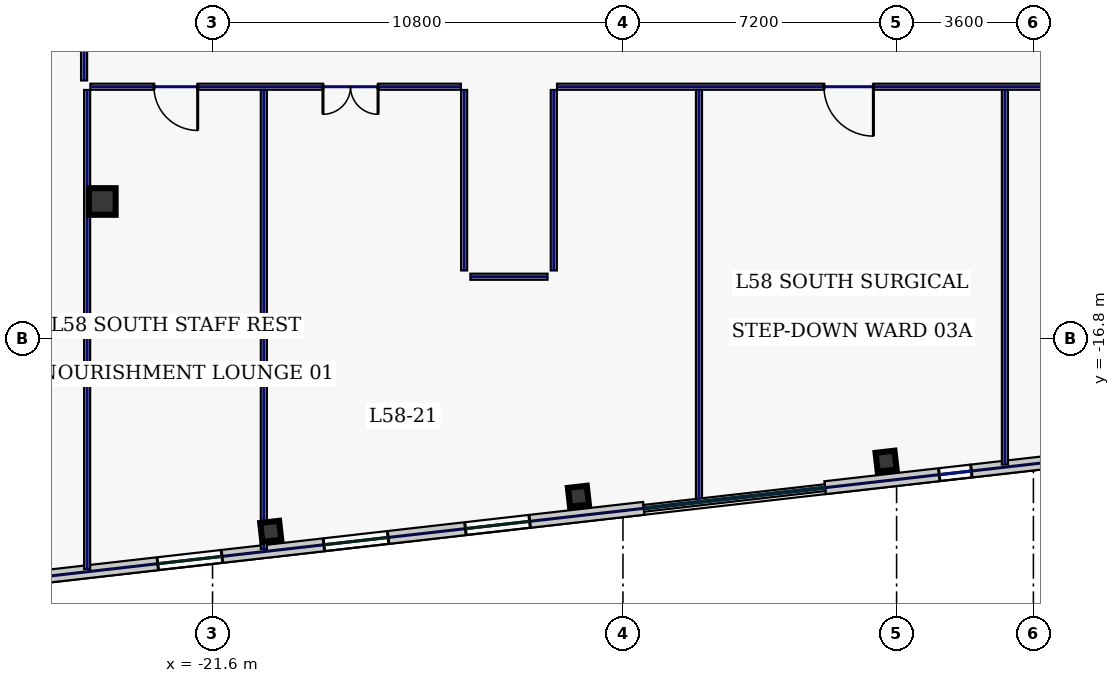
"""IFC4 building model, lengths in metres.
Left out: names, types, materials, properties, quantities, classifications, styles, units other than length and angle.
Written with IfcOpenShell. Run it as: python <this file> out.ifc"""

import sys

from ifc_helpers import new_model, si_unit, direction, frame, frame_2d, origin, origin_2d, place, context, subcontext, project, spatial, rectangle, hollow_rectangle, extrude, element, fill, save


model = new_model("IFC4")
c1 = context("Model", 3, precision=1e-05, world=origin(), true_north=direction((0.0, 1.0)))
c2 = subcontext(c1, "Body", "Model", "MODEL_VIEW")
j1 = project(units=[si_unit("LENGTHUNIT", "METRE"), si_unit("PLANEANGLEUNIT", "RADIAN")], contexts=[c1])
p1 = place(None, origin())
s1 = spatial("IfcSite", under=j1, at=p1, CompositionType="ELEMENT")
p2 = place(p1, origin())
s2 = spatial("IfcBuilding", under=s1, at=p2, CompositionType="ELEMENT")
p3 = place(p2, frame((0.0, 0.0, 251.0)))
s3 = spatial("IfcBuildingStorey", under=s2, at=p3, CompositionType="ELEMENT", Elevation=251.0)
p4 = place(p3, frame((-24.5, -13.2, 0.0), z_axis=(0.0, 0.0, 1.0), x_axis=(1.0, 0.0, 0.0)))
e1 = element("IfcColumn", 1, at=p4, inside=s3, PredefinedType="COLUMN", context=c2, shape_type="SweptSolid", body=[
    extrude(hollow_rectangle(XDim=0.7, YDim=0.7, WallThickness=0.032, at=origin_2d()), origin(), (0.0, 0.0, 1.0), 3.74),
])
for number, where, z_axis, x_axis in (
    (2, (-20.069, -21.88, 0.0), (0.0, 0.0, 1.0), (0.994, 0.113, 0.0)),
    (3, (-11.972, -20.958, 0.0), (0.0, 0.0, 1.0), (0.994, 0.113, 0.0)),
    (4, (-3.876, -20.035, 0.0), (0.0, 0.0, 1.0), (0.994, 0.113, 0.0)),
):
    element("IfcColumn", number, at=place(p3, frame(where, z_axis=z_axis, x_axis=x_axis)), inside=s3, PredefinedType="COLUMN", context=c2, shape_type="SweptSolid", body=[
        extrude(hollow_rectangle(XDim=0.5, YDim=0.5, WallThickness=0.025, at=origin_2d()), origin(), (0.0, 0.0, 1.0), 3.74),
    ])
p5 = place(p3, frame((-28.783, -23.386, 0.0), z_axis=(0.0, 0.0, 1.0), x_axis=(0.993572271362, 0.113199565282, 0.0)))
e5 = element("IfcWall", 5, at=p5, inside=s3, PredefinedType="STANDARD", context=c2, shape_type="SweptSolid", body=[
    extrude(rectangle(XDim=18.651, YDim=0.34, at=frame_2d((9.326, 0.0))), origin(), (0.0, 0.0, 1.0), 3.74),
])
p6 = place(p5, frame((2.03, 0.0, 0.88)))
e6 = element("IfcOpeningElement", 6, at=p6, cuts=e5, PredefinedType="OPENING", context=c2, shape_type="SweptSolid", body=[
    extrude(rectangle(XDim=0.85, YDim=1.85, at=frame_2d((0.425, 0.925))), frame((0.0, 0.18, 0.0), z_axis=(0.0, -1.0, 0.0), x_axis=(1.0, 0.0, 0.0)), (0.0, 0.0, 1.0), 0.36),
])
p7 = place(p5, frame((5.779, 0.0, 0.88)))
e7 = element("IfcOpeningElement", 7, at=p7, cuts=e5, PredefinedType="OPENING", context=c2, shape_type="SweptSolid", body=[
    extrude(rectangle(XDim=1.7, YDim=1.95, at=frame_2d((0.85, 0.975))), frame((0.0, 0.18, 0.0), z_axis=(0.0, -1.0, 0.0), x_axis=(1.0, 0.0, 0.0)), (0.0, 0.0, 1.0), 0.36),
])
p8 = place(p5, frame((10.179, 0.0, 0.88)))
e8 = element("IfcOpeningElement", 8, at=p8, cuts=e5, PredefinedType="OPENING", context=c2, shape_type="SweptSolid", body=[
    extrude(rectangle(XDim=1.7, YDim=1.95, at=frame_2d((0.85, 0.975))), frame((0.0, 0.18, 0.0), z_axis=(0.0, -1.0, 0.0), x_axis=(1.0, 0.0, 0.0)), (0.0, 0.0, 1.0), 0.36),
])
p9 = place(p5, frame((13.927, 0.0, 0.88)))
e9 = element("IfcOpeningElement", 9, at=p9, cuts=e5, PredefinedType="OPENING", context=c2, shape_type="SweptSolid", body=[
    extrude(rectangle(XDim=1.7, YDim=1.95, at=frame_2d((0.85, 0.975))), frame((0.0, 0.18, 0.0), z_axis=(0.0, -1.0, 0.0), x_axis=(1.0, 0.0, 0.0)), (0.0, 0.0, 1.0), 0.36),
])
p10 = place(p3, frame((-5.482, -20.731, 0.0), z_axis=(0.0, 0.0, 1.0), x_axis=(0.993571968199, 0.113202226169, 0.0)))
e10 = element("IfcWall", 10, at=p10, inside=s3, PredefinedType="STANDARD", context=c2, shape_type="SweptSolid", body=[
    extrude(rectangle(XDim=11.497, YDim=0.34, at=frame_2d((5.749, 0.0))), origin(), (0.0, 0.0, 1.0), 3.74),
])
p11 = place(p10, frame((3.024, 0.0, 0.88)))
e11 = element("IfcOpeningElement", 11, at=p11, cuts=e10, PredefinedType="OPENING", context=c2, shape_type="SweptSolid", body=[
    extrude(rectangle(XDim=0.85, YDim=1.85, at=frame_2d((0.425, 0.925))), frame((0.0, 0.18, 0.0), z_axis=(0.0, -1.0, 0.0), x_axis=(1.0, 0.0, 0.0)), (0.0, 0.0, 1.0), 0.36),
])
p12 = place(p10, frame((6.773, 0.0, 0.88)))
e12 = element("IfcOpeningElement", 12, at=p12, cuts=e10, PredefinedType="OPENING", context=c2, shape_type="SweptSolid", body=[
    extrude(rectangle(XDim=1.7, YDim=1.95, at=frame_2d((0.85, 0.975))), frame((0.0, 0.18, 0.0), z_axis=(0.0, -1.0, 0.0), x_axis=(1.0, 0.0, 0.0)), (0.0, 0.0, 1.0), 0.36),
])
p13 = place(p3, frame((-24.98, -10.015, 0.0), z_axis=(0.0, 0.0, 1.0), x_axis=(0.0, 1.0, 0.0)))
e13 = element("IfcWall", 13, at=p13, inside=s3, PredefinedType="PARTITIONING", context=c2, shape_type="SweptSolid", body=[
    extrude(rectangle(XDim=20.13, YDim=0.16, at=frame_2d((10.065, 0.0))), origin(), (0.0, 0.0, 1.0), 3.74),
])
p14 = place(p13, frame((2.169, 0.0, 0.0)))
e14 = element("IfcOpeningElement", 14, at=p14, cuts=e13, PredefinedType="OPENING", context=c2, shape_type="SweptSolid", body=[
    extrude(rectangle(XDim=0.95, YDim=2.2, at=frame_2d((0.475, 1.1))), frame((0.0, 0.09, 0.0), z_axis=(0.0, -1.0, 0.0), x_axis=(1.0, 0.0, 0.0)), (0.0, 0.0, 1.0), 0.18),
])
p15 = place(p13, frame((7.025, 0.0, 0.0)))
e15 = element("IfcOpeningElement", 15, at=p15, cuts=e13, PredefinedType="OPENING", context=c2, shape_type="SweptSolid", body=[
    extrude(rectangle(XDim=0.95, YDim=2.2, at=frame_2d((0.475, 1.1))), frame((0.0, 0.09, 0.0), z_axis=(0.0, -1.0, 0.0), x_axis=(1.0, 0.0, 0.0)), (0.0, 0.0, 1.0), 0.18),
])
p16 = place(p13, frame((12.225, 0.0, 0.0)))
e16 = element("IfcOpeningElement", 16, at=p16, cuts=e13, PredefinedType="OPENING", context=c2, shape_type="SweptSolid", body=[
    extrude(rectangle(XDim=0.95, YDim=2.2, at=frame_2d((0.475, 1.1))), frame((0.0, 0.09, 0.0), z_axis=(0.0, -1.0, 0.0), x_axis=(1.0, 0.0, 0.0)), (0.0, 0.0, 1.0), 0.18),
])
p17 = place(p13, frame((17.131, 0.0, 0.0)))
e17 = element("IfcOpeningElement", 17, at=p17, cuts=e13, PredefinedType="OPENING", context=c2, shape_type="SweptSolid", body=[
    extrude(rectangle(XDim=0.95, YDim=2.2, at=frame_2d((0.475, 1.1))), frame((0.0, 0.09, 0.0), z_axis=(0.0, -1.0, 0.0), x_axis=(1.0, 0.0, 0.0)), (0.0, 0.0, 1.0), 0.18),
])
p18 = place(p3, frame((24.815, -10.18, 0.0), z_axis=(0.0, 0.0, 1.0), x_axis=(-1.0, 0.0, 0.0)))
e18 = element("IfcWall", 18, at=p18, inside=s3, PredefinedType="PARTITIONING", context=c2, shape_type="SweptSolid", body=[
    extrude(rectangle(XDim=37.35, YDim=0.16, at=frame_2d((18.675, 0.0))), origin(), (0.0, 0.0, 1.0), 3.74),
])
p19 = place(p18, frame((29.025, 0.0, 0.0)))
e19 = element("IfcOpeningElement", 19, at=p19, cuts=e18, PredefinedType="OPENING", context=c2, shape_type="SweptSolid", body=[
    extrude(rectangle(XDim=1.3, YDim=2.2, at=frame_2d((0.65, 1.1))), frame((0.0, 0.09, 0.0), z_axis=(0.0, -1.0, 0.0), x_axis=(1.0, 0.0, 0.0)), (0.0, 0.0, 1.0), 0.18),
])
p20 = place(p18, frame((21.6, 0.0, 0.0)))
e20 = element("IfcOpeningElement", 20, at=p20, cuts=e18, PredefinedType="OPENING", context=c2, shape_type="SweptSolid", body=[
    extrude(rectangle(XDim=1.05, YDim=2.2, at=frame_2d((0.525, 1.1))), frame((0.0, 0.09, 0.0), z_axis=(0.0, -1.0, 0.0), x_axis=(1.0, 0.0, 0.0)), (0.0, 0.0, 1.0), 0.18),
])
p21 = place(p18, frame((11.1, 0.0, 0.0)))
e21 = element("IfcOpeningElement", 21, at=p21, cuts=e18, PredefinedType="OPENING", context=c2, shape_type="SweptSolid", body=[
    extrude(rectangle(XDim=0.95, YDim=2.2, at=frame_2d((0.475, 1.1))), frame((0.0, 0.09, 0.0), z_axis=(0.0, -1.0, 0.0), x_axis=(1.0, 0.0, 0.0)), (0.0, 0.0, 1.0), 0.18),
])
p22 = place(p18, frame((2.044, 0.0, 0.0)))
e22 = element("IfcOpeningElement", 22, at=p22, cuts=e18, PredefinedType="OPENING", context=c2, shape_type="SweptSolid", body=[
    extrude(rectangle(XDim=0.95, YDim=2.2, at=frame_2d((0.475, 1.1))), frame((0.0, 0.09, 0.0), z_axis=(0.0, -1.0, 0.0), x_axis=(1.0, 0.0, 0.0)), (0.0, 0.0, 1.0), 0.18),
])
p23 = place(p3, frame((-12.62, -10.265, 0.0), z_axis=(0.0, 0.0, 1.0), x_axis=(0.0, -1.0, 0.0)))
e23 = element("IfcWall", 23, at=p23, inside=s3, PredefinedType="PARTITIONING", context=c2, shape_type="SweptSolid", body=[
    extrude(rectangle(XDim=4.75, YDim=0.16, at=frame_2d((2.375, 0.0))), origin(), (0.0, 0.0, 1.0), 3.74),
])
p24 = place(p3, frame((-12.785, -15.18, 0.0), z_axis=(0.0, 0.0, 1.0), x_axis=(-1.0, 0.0, 0.0)))
e24 = element("IfcWall", 24, at=p24, inside=s3, PredefinedType="PARTITIONING", context=c2, shape_type="SweptSolid", body=[
    extrude(rectangle(XDim=2.03, YDim=0.16, at=frame_2d((1.015, 0.0))), origin(), (0.0, 0.0, 1.0), 3.74),
])
p25 = place(p3, frame((-14.98, -15.015, 0.0), z_axis=(0.0, 0.0, 1.0), x_axis=(0.0, 1.0, 0.0)))
e25 = element("IfcWall", 25, at=p25, inside=s3, PredefinedType="PARTITIONING", context=c2, shape_type="SweptSolid", body=[
    extrude(rectangle(XDim=4.75, YDim=0.16, at=frame_2d((2.375, 0.0))), origin(), (0.0, 0.0, 1.0), 3.74),
])
p26 = place(p3, frame((-15.065, -10.18, 0.0), z_axis=(0.0, 0.0, 1.0), x_axis=(-1.0, 0.0, 0.0)))
e26 = element("IfcWall", 26, at=p26, inside=s3, PredefinedType="PARTITIONING", context=c2, shape_type="SweptSolid", body=[
    extrude(rectangle(XDim=9.75, YDim=0.16, at=frame_2d((4.875, 0.0))), origin(), (0.0, 0.0, 1.0), 3.74),
])
p27 = place(p26, frame((6.926, 0.0, 0.0)))
e27 = element("IfcOpeningElement", 27, at=p27, cuts=e26, PredefinedType="OPENING", context=c2, shape_type="SweptSolid", body=[
    extrude(rectangle(XDim=1.15, YDim=2.2, at=frame_2d((0.575, 1.1))), frame((0.0, 0.09, 0.0), z_axis=(0.0, -1.0, 0.0), x_axis=(1.0, 0.0, 0.0)), (0.0, 0.0, 1.0), 0.18),
])
p28 = place(p26, frame((2.179, 0.0, 0.0)))
e28 = element("IfcOpeningElement", 28, at=p28, cuts=e26, PredefinedType="OPENING", context=c2, shape_type="SweptSolid", body=[
    extrude(rectangle(XDim=1.45, YDim=2.2, at=frame_2d((0.725, 1.1))), frame((0.0, 0.09, 0.0), z_axis=(0.0, -1.0, 0.0), x_axis=(1.0, 0.0, 0.0)), (0.0, 0.0, 1.0), 0.18),
])
p29 = place(p3, frame((-24.9, -22.873, 0.0), z_axis=(0.0, 0.0, 1.0), x_axis=(0.0, 1.0, 0.0)))
e29 = element("IfcWall", 29, at=p29, inside=s3, PredefinedType="PARTITIONING", context=c2, shape_type="SweptSolid", body=[
    extrude(rectangle(XDim=12.608, YDim=0.16, at=frame_2d((6.304, 0.0))), origin(), (0.0, 0.0, 1.0), 3.74),
])
p30 = place(p3, frame((-20.25, -22.344, 0.0), z_axis=(0.0, 0.0, 1.0), x_axis=(0.0, 1.0, 0.0)))
e30 = element("IfcWall", 30, at=p30, inside=s3, PredefinedType="PARTITIONING", context=c2, shape_type="SweptSolid", body=[
    extrude(rectangle(XDim=12.079, YDim=0.16, at=frame_2d((6.039, 0.0))), origin(), (0.0, 0.0, 1.0), 3.74),
])
p31 = place(p3, frame((-8.8, -21.039, 0.0), z_axis=(0.0, 0.0, 1.0), x_axis=(0.0, 1.0, 0.0)))
e31 = element("IfcWall", 31, at=p31, inside=s3, PredefinedType="PARTITIONING", context=c2, shape_type="SweptSolid", body=[
    extrude(rectangle(XDim=10.774, YDim=0.16, at=frame_2d((5.387, 0.0))), origin(), (0.0, 0.0, 1.0), 3.74),
])
p32 = place(p3, frame((-0.75, -20.122, 0.0), z_axis=(0.0, 0.0, 1.0), x_axis=(0.0, 1.0, 0.0)))
e32 = element("IfcWall", 32, at=p32, inside=s3, PredefinedType="PARTITIONING", context=c2, shape_type="SweptSolid", body=[
    extrude(rectangle(XDim=9.857, YDim=0.16, at=frame_2d((4.928, 0.0))), origin(), (0.0, 0.0, 1.0), 3.74),
])
p33 = place(p7, origin())
e33 = element("IfcWindow", 33, at=p33, inside=s3, PartitioningType="SINGLE_PANEL", PredefinedType="WINDOW", context=c2, shape_type="SweptSolid", body=[
    extrude(rectangle(XDim=1.7, YDim=1.95, at=frame_2d((0.85, 0.975))), frame((0.0, 0.03, 0.0), z_axis=(0.0, -1.0, 0.0), x_axis=(1.0, 0.0, 0.0)), (0.0, 0.0, 1.0), 0.06),
])
fill(e7, e33)
p34 = place(p8, origin())
e34 = element("IfcWindow", 34, at=p34, inside=s3, PartitioningType="SINGLE_PANEL", PredefinedType="WINDOW", context=c2, shape_type="SweptSolid", body=[
    extrude(rectangle(XDim=1.7, YDim=1.95, at=frame_2d((0.85, 0.975))), frame((0.0, 0.03, 0.0), z_axis=(0.0, -1.0, 0.0), x_axis=(1.0, 0.0, 0.0)), (0.0, 0.0, 1.0), 0.06),
])
fill(e8, e34)
p35 = place(p9, origin())
e35 = element("IfcWindow", 35, at=p35, inside=s3, PartitioningType="SINGLE_PANEL", PredefinedType="WINDOW", context=c2, shape_type="SweptSolid", body=[
    extrude(rectangle(XDim=1.7, YDim=1.95, at=frame_2d((0.85, 0.975))), frame((0.0, 0.03, 0.0), z_axis=(0.0, -1.0, 0.0), x_axis=(1.0, 0.0, 0.0)), (0.0, 0.0, 1.0), 0.06),
])
fill(e9, e35)
p36 = place(p11, origin())
e36 = element("IfcWindow", 36, at=p36, inside=s3, PartitioningType="SINGLE_PANEL", PredefinedType="WINDOW", context=c2, shape_type="SweptSolid", body=[
    extrude(rectangle(XDim=0.85, YDim=1.85, at=frame_2d((0.425, 0.925))), frame((0.0, 0.03, 0.0), z_axis=(0.0, -1.0, 0.0), x_axis=(1.0, 0.0, 0.0)), (0.0, 0.0, 1.0), 0.06),
])
fill(e11, e36)
p37 = place(p27, origin())
e37 = element("IfcDoor", 37, at=p37, inside=s3, OperationType="SINGLE_SWING_LEFT", PredefinedType="DOOR", context=c2, shape_type="SweptSolid", body=[
    extrude(rectangle(XDim=1.15, YDim=2.2, at=frame_2d((0.575, 1.1))), frame((0.0, 0.025, 0.0), z_axis=(0.0, -1.0, 0.0), x_axis=(1.0, 0.0, 0.0)), (0.0, 0.0, 1.0), 0.05),
])
fill(e27, e37)
p38 = place(p28, origin())
e38 = element("IfcDoor", 38, at=p38, inside=s3, OperationType="DOUBLE_SWING_LEFT", PredefinedType="DOOR", context=c2, shape_type="SweptSolid", body=[
    extrude(rectangle(XDim=1.45, YDim=2.2, at=frame_2d((0.725, 1.1))), frame((0.0, 0.025, 0.0), z_axis=(0.0, -1.0, 0.0), x_axis=(1.0, 0.0, 0.0)), (0.0, 0.0, 1.0), 0.05),
])
fill(e28, e38)
p39 = place(p19, origin())
e39 = element("IfcDoor", 39, at=p39, inside=s3, OperationType="SINGLE_SWING_LEFT", PredefinedType="DOOR", context=c2, shape_type="SweptSolid", body=[
    extrude(rectangle(XDim=1.3, YDim=2.2, at=frame_2d((0.65, 1.1))), frame((0.0, 0.025, 0.0), z_axis=(0.0, -1.0, 0.0), x_axis=(1.0, 0.0, 0.0)), (0.0, 0.0, 1.0), 0.05),
])
fill(e19, e39)
save(model, sys.argv[1])
